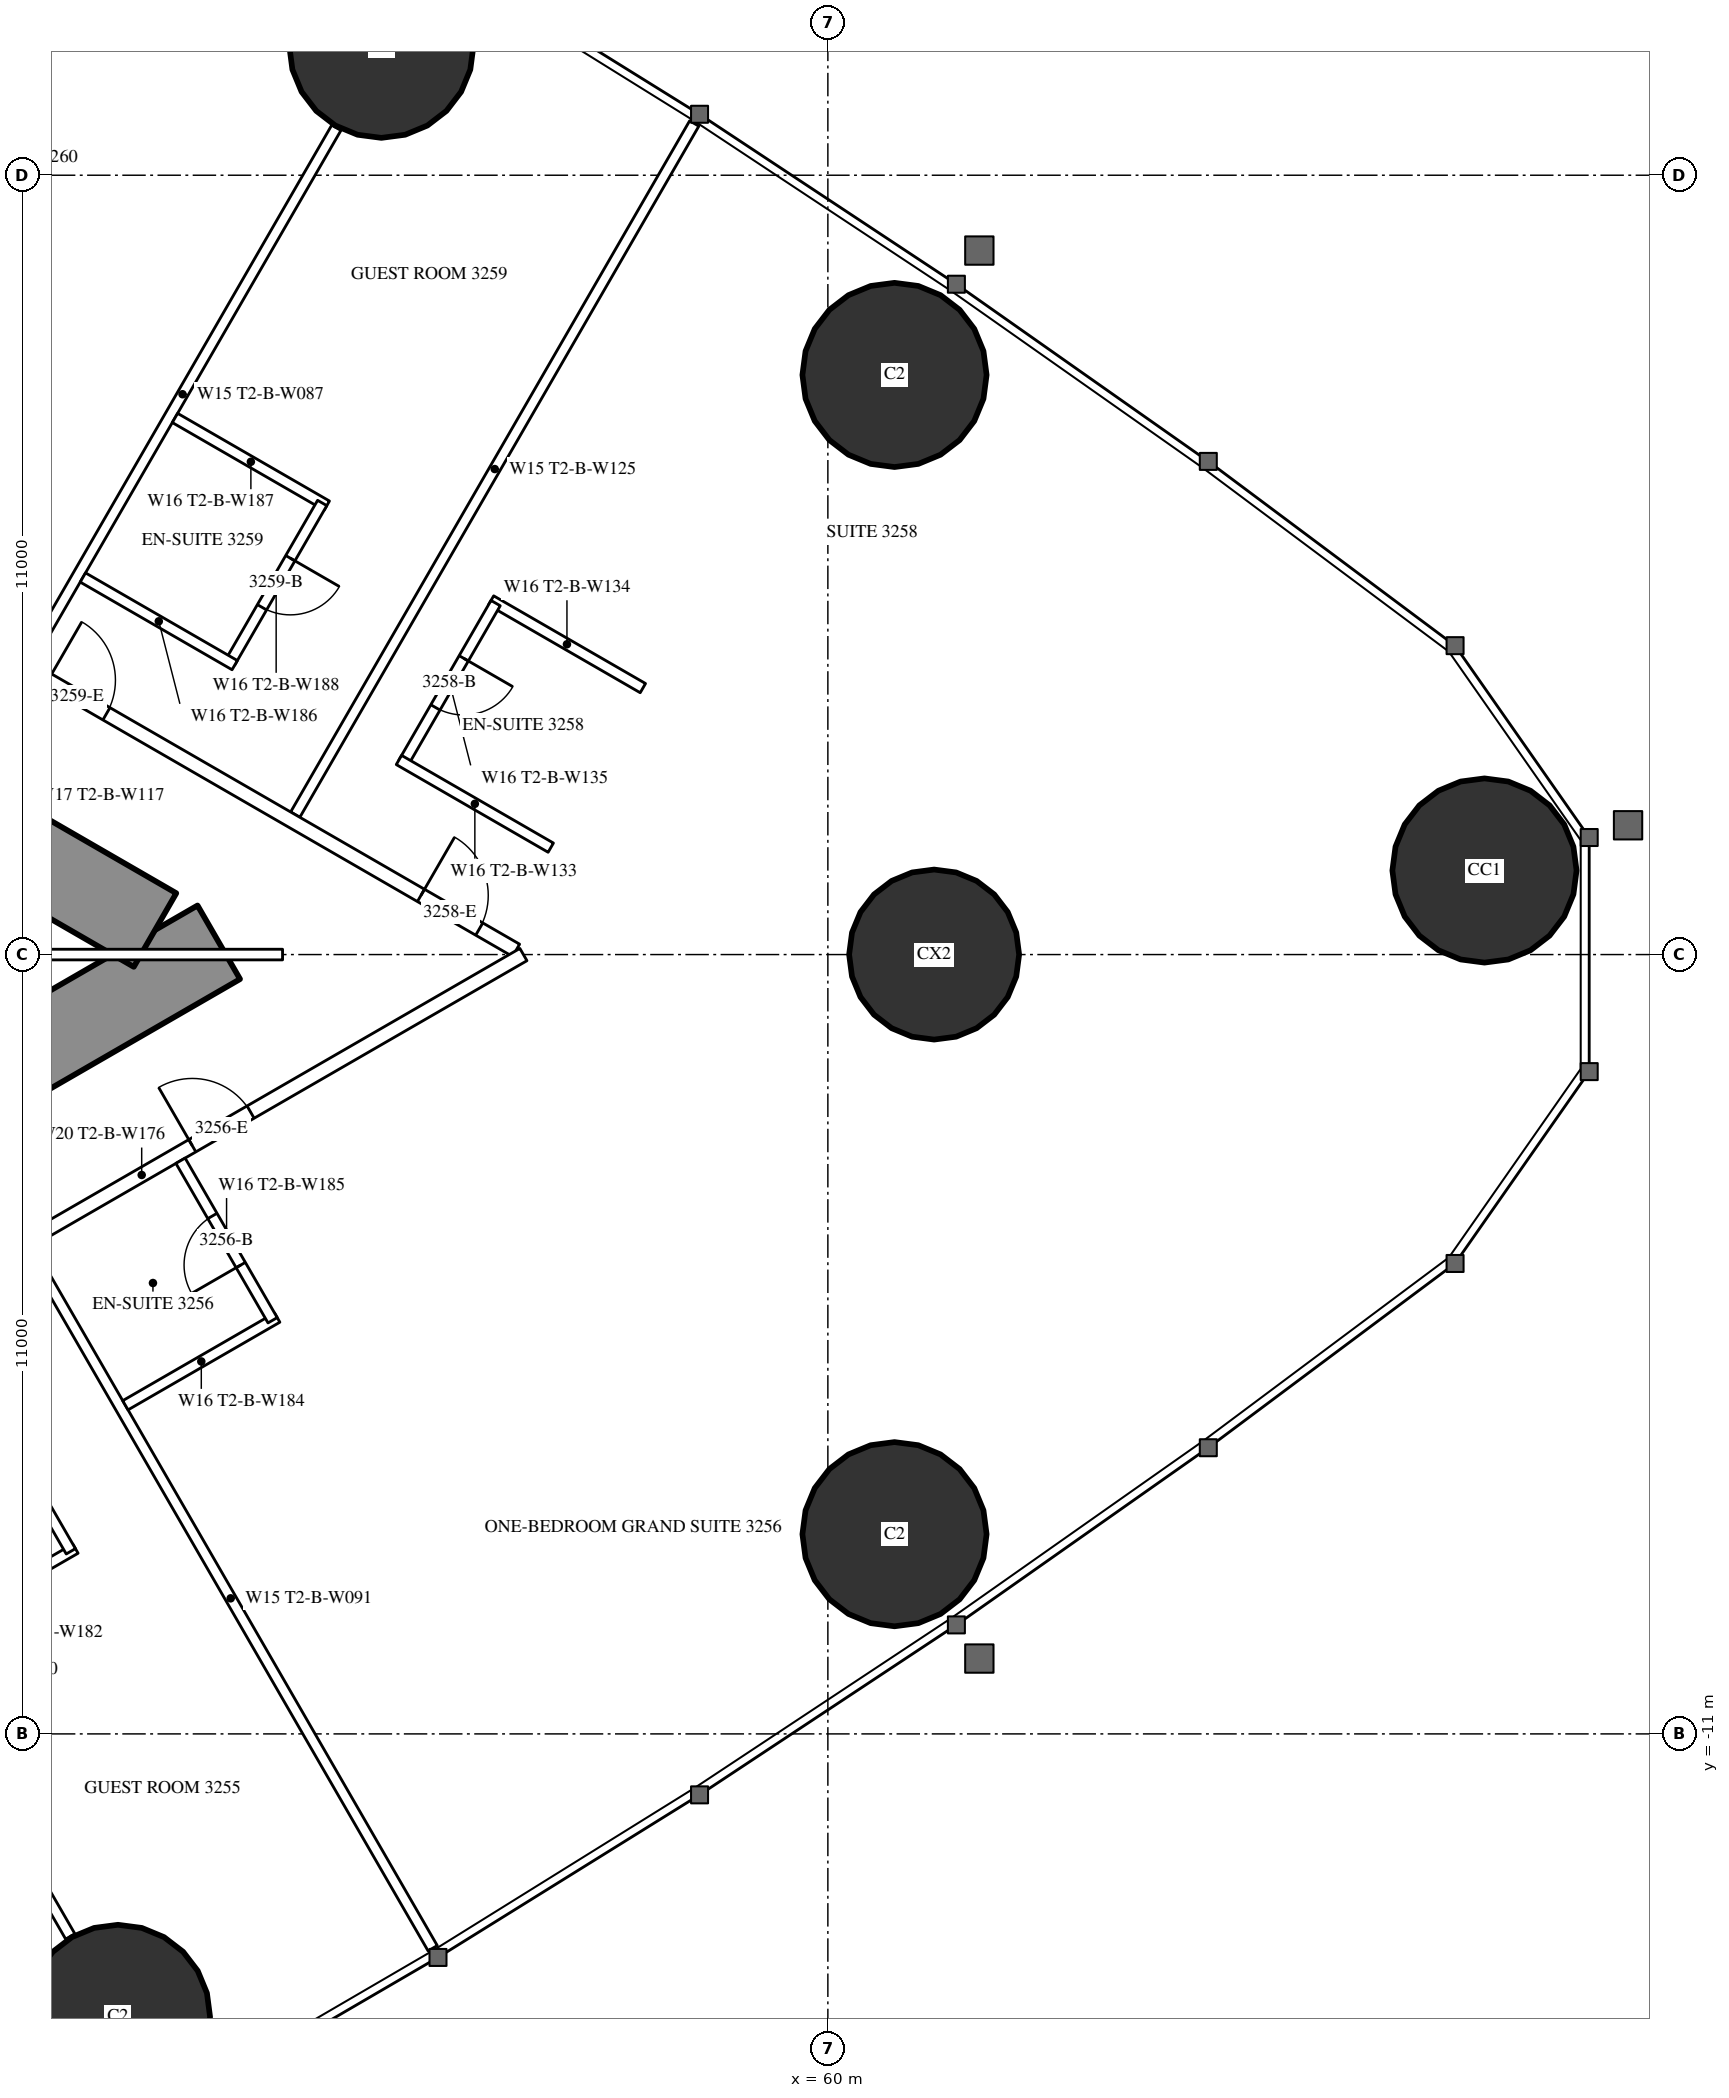
"""IFC4 building model, lengths in metres.
Left out: names, types, materials, properties, quantities, classifications, styles, units other than length and angle.
Written with IfcOpenShell. Run it as: python <this file> out.ifc"""

import sys

from ifc_helpers import new_model, si_unit, direction, frame, frame_2d, origin, origin_2d, place, context, subcontext, project, spatial, rectangle, circle, hollow_circle, extrude, element, fill, save


model = new_model("IFC4")
c1 = context("Model", 3, precision=1e-05, world=origin(), true_north=direction((0.0, 1.0)))
c2 = subcontext(c1, "Body", "Model", "MODEL_VIEW")
j1 = project(units=[si_unit("LENGTHUNIT", "METRE"), si_unit("PLANEANGLEUNIT", "RADIAN")], contexts=[c1])
p1 = place(None, origin())
s1 = spatial("IfcSite", under=j1, at=p1, CompositionType="ELEMENT")
p2 = place(p1, origin())
s2 = spatial("IfcBuilding", under=s1, at=p2, CompositionType="ELEMENT")
p3 = place(p2, frame((0.0, 0.0, 122.1)))
s3 = spatial("IfcBuildingStorey", under=s2, at=p3, CompositionType="ELEMENT", Elevation=122.1)
for number, where, z_axis, x_axis in (
    (1, (69.269, 1.187, 0.0), (0.0, 0.0, 1.0), (1.0, 0.0, 0.0)),
    (2, (60.941, 8.181, 0.0), (0.0, 0.0, 1.0), (1.0, 0.0, 0.0)),
    (3, (53.697, 12.827, 0.0), (0.0, 0.0, 1.0), (1.0, 0.0, 0.0)),
    (4, (49.979, -14.994, 0.0), (0.0, 0.0, 1.0), (1.0, 0.0, 0.0)),
    (5, (60.941, -8.181, 0.0), (0.0, 0.0, 1.0), (1.0, 0.0, 0.0)),
):
    element("IfcColumn", number, at=place(p3, frame(where, z_axis=z_axis, x_axis=x_axis)), inside=s3, PredefinedType="COLUMN", context=c2, shape_type="SweptSolid", body=[
        extrude(hollow_circle(Radius=1.3, WallThickness=0.1, at=origin_2d()), origin(), (0.0, 0.0, 1.0), 3.5),
    ])
p4 = place(p3, frame((61.5, 0.0, 0.0), z_axis=(0.0, 0.0, 1.0), x_axis=(1.0, 0.0, 0.0)))
e6 = element("IfcColumn", 6, at=p4, inside=s3, PredefinedType="COLUMN", context=c2, shape_type="SweptSolid", body=[
    extrude(circle(Radius=1.2, at=origin_2d()), origin(), (0.0, 0.0, 1.0), 3.5),
])
p5 = place(p3, frame((27.2, -13.8, 0.0), z_axis=(0.0, 0.0, 1.0), x_axis=(0.866027159892, 0.499996958321, 0.0)))
e7 = element("IfcWall", 7, at=p5, inside=s3, PredefinedType="SHEAR", context=c2, shape_type="SweptSolid", body=[
    extrude(rectangle(XDim=27.947, YDim=1.2, at=frame_2d((13.973, 0.0))), origin(), (0.0, 0.0, 1.0), 3.5),
])
p6 = place(p5, frame((4.6, 0.0, 0.0)))
e8 = element("IfcOpeningElement", 8, at=p6, cuts=e7, PredefinedType="OPENING", context=c2, shape_type="SweptSolid", body=[
    extrude(rectangle(XDim=1.0, YDim=2.2, at=frame_2d((0.5, 1.1))), frame((0.0, 0.61, 0.0), z_axis=(0.0, -1.0, 0.0), x_axis=(1.0, 0.0, 0.0)), (0.0, 0.0, 1.0), 1.22),
])
p7 = place(p5, frame((13.395, 0.0, 0.0)))
e9 = element("IfcOpeningElement", 9, at=p7, cuts=e7, PredefinedType="OPENING", context=c2, shape_type="SweptSolid", body=[
    extrude(rectangle(XDim=1.8, YDim=2.2, at=frame_2d((0.9, 1.1))), frame((0.0, 0.61, 0.0), z_axis=(0.0, -1.0, 0.0), x_axis=(1.0, 0.0, 0.0)), (0.0, 0.0, 1.0), 1.22),
])
p8 = place(p3, frame((27.2, 13.8, 0.0), z_axis=(0.0, 0.0, 1.0), x_axis=(0.866024515034, -0.500001539357, 0.0)))
e10 = element("IfcWall", 10, at=p8, inside=s3, PredefinedType="SHEAR", context=c2, shape_type="SweptSolid", body=[
    extrude(rectangle(XDim=26.907, YDim=1.2, at=frame_2d((13.454, 0.0))), origin(), (0.0, 0.0, 1.0), 3.5),
])
p9 = place(p8, frame((4.6, 0.0, 0.0)))
e11 = element("IfcOpeningElement", 11, at=p9, cuts=e10, PredefinedType="OPENING", context=c2, shape_type="SweptSolid", body=[
    extrude(rectangle(XDim=1.0, YDim=2.2, at=frame_2d((0.5, 1.1))), frame((0.0, 0.61, 0.0), z_axis=(0.0, -1.0, 0.0), x_axis=(1.0, 0.0, 0.0)), (0.0, 0.0, 1.0), 1.22),
])
p10 = place(p8, frame((13.395, 0.0, 0.0)))
e12 = element("IfcOpeningElement", 12, at=p10, cuts=e10, PredefinedType="OPENING", context=c2, shape_type="SweptSolid", body=[
    extrude(rectangle(XDim=1.8, YDim=2.2, at=frame_2d((0.9, 1.1))), frame((0.0, 0.61, 0.0), z_axis=(0.0, -1.0, 0.0), x_axis=(1.0, 0.0, 0.0)), (0.0, 0.0, 1.0), 1.22),
])
p11 = place(p3, frame((44.954, -6.321, 0.0), z_axis=(0.0, 0.0, 1.0), x_axis=(0.500018676722, -0.866014620505, 0.0)))
e13 = element("IfcWall", 13, at=p11, inside=s3, PredefinedType="PARTITIONING", context=c2, shape_type="SweptSolid", body=[
    extrude(rectangle(XDim=8.704, YDim=0.15, at=frame_2d((4.352, 0.0))), origin(), (0.0, 0.0, 1.0), 2.2),
])
p12 = place(p3, frame((48.719, -4.147, 0.0), z_axis=(0.0, 0.0, 1.0), x_axis=(0.499990498062, -0.866030889661, 0.0)))
e14 = element("IfcWall", 14, at=p12, inside=s3, PredefinedType="PARTITIONING", context=c2, shape_type="SweptSolid", body=[
    extrude(rectangle(XDim=11.406, YDim=0.15, at=frame_2d((5.703, 0.0))), origin(), (0.0, 0.0, 1.0), 3.25),
])
p13 = place(p3, frame((48.719, 4.147, 0.0), z_axis=(0.0, 0.0, 1.0), x_axis=(0.499993328235, 0.866029255696, 0.0)))
e15 = element("IfcWall", 15, at=p13, inside=s3, PredefinedType="PARTITIONING", context=c2, shape_type="SweptSolid", body=[
    extrude(rectangle(XDim=8.686, YDim=0.15, at=frame_2d((4.343, 0.0))), origin(), (0.0, 0.0, 1.0), 2.2),
])
p14 = place(p3, frame((52.481, 1.975, 0.0), z_axis=(0.0, 0.0, 1.0), x_axis=(0.500003867771, 0.866023170714, 0.0)))
e16 = element("IfcWall", 16, at=p14, inside=s3, PredefinedType="PARTITIONING", context=c2, shape_type="SweptSolid", body=[
    extrude(rectangle(XDim=11.265, YDim=0.15, at=frame_2d((5.632, 0.0))), origin(), (0.0, 0.0, 1.0), 3.25),
])
p15 = place(p3, frame((36.834, 10.894, 0.0), z_axis=(0.0, 0.0, 1.0), x_axis=(0.866028157229, -0.499995230863, 0.0)))
e17 = element("IfcWall", 17, at=p15, inside=s3, PredefinedType="PARTITIONING", context=c2, shape_type="SweptSolid", body=[
    extrude(rectangle(XDim=21.667, YDim=0.2, at=frame_2d((10.833, 0.0))), origin(), (0.0, 0.0, 1.0), 3.25),
])
p16 = place(p15, frame((20.117, 0.0, 0.0)))
e18 = element("IfcOpeningElement", 18, at=p16, cuts=e17, PredefinedType="OPENING", context=c2, shape_type="SweptSolid", body=[
    extrude(rectangle(XDim=0.95, YDim=2.2, at=frame_2d((0.475, 1.1))), frame((0.0, 0.11, 0.0), z_axis=(0.0, -1.0, 0.0), x_axis=(1.0, 0.0, 0.0)), (0.0, 0.0, 1.0), 0.22),
])
p17 = place(p15, frame((14.04, 0.0, 0.0)))
e19 = element("IfcOpeningElement", 19, at=p17, cuts=e17, PredefinedType="OPENING", context=c2, shape_type="SweptSolid", body=[
    extrude(rectangle(XDim=0.95, YDim=2.2, at=frame_2d((0.475, 1.1))), frame((0.0, 0.11, 0.0), z_axis=(0.0, -1.0, 0.0), x_axis=(1.0, 0.0, 0.0)), (0.0, 0.0, 1.0), 0.22),
])
p18 = place(p15, frame((7.697, 0.0, 0.0)))
e20 = element("IfcOpeningElement", 20, at=p18, cuts=e17, PredefinedType="OPENING", context=c2, shape_type="SweptSolid", body=[
    extrude(rectangle(XDim=0.95, YDim=2.2, at=frame_2d((0.475, 1.1))), frame((0.0, 0.11, 0.0), z_axis=(0.0, -1.0, 0.0), x_axis=(1.0, 0.0, 0.0)), (0.0, 0.0, 1.0), 0.22),
])
p19 = place(p15, frame((3.35, 0.0, 0.0)))
e21 = element("IfcOpeningElement", 21, at=p19, cuts=e17, PredefinedType="OPENING", context=c2, shape_type="SweptSolid", body=[
    extrude(rectangle(XDim=1.0, YDim=2.2, at=frame_2d((0.5, 1.1))), frame((0.0, 0.11, 0.0), z_axis=(0.0, -1.0, 0.0), x_axis=(1.0, 0.0, 0.0)), (0.0, 0.0, 1.0), 0.22),
])
p20 = place(p3, frame((44.925, -6.222, 0.0), z_axis=(0.0, 0.0, 1.0), x_axis=(0.866020269055, 0.500008893506, 0.0)))
e22 = element("IfcWall", 22, at=p20, inside=s3, PredefinedType="PARTITIONING", context=c2, shape_type="SweptSolid", body=[
    extrude(rectangle(XDim=12.444, YDim=0.2, at=frame_2d((6.222, 0.0))), origin(), (0.0, 0.0, 1.0), 3.25),
])
p21 = place(p20, frame((0.6, 0.0, 0.0)))
e23 = element("IfcOpeningElement", 23, at=p21, cuts=e22, PredefinedType="OPENING", context=c2, shape_type="SweptSolid", body=[
    extrude(rectangle(XDim=0.95, YDim=2.2, at=frame_2d((0.475, 1.1))), frame((0.0, 0.11, 0.0), z_axis=(0.0, -1.0, 0.0), x_axis=(1.0, 0.0, 0.0)), (0.0, 0.0, 1.0), 0.22),
])
p22 = place(p20, frame((7.047, 0.0, 0.0)))
e24 = element("IfcOpeningElement", 24, at=p22, cuts=e22, PredefinedType="OPENING", context=c2, shape_type="SweptSolid", body=[
    extrude(rectangle(XDim=0.95, YDim=2.2, at=frame_2d((0.475, 1.1))), frame((0.0, 0.11, 0.0), z_axis=(0.0, -1.0, 0.0), x_axis=(1.0, 0.0, 0.0)), (0.0, 0.0, 1.0), 0.22),
])
p23 = place(p3, frame((47.235, -9.623, 0.0), z_axis=(0.0, 0.0, 1.0), x_axis=(0.866006523861, 0.500032699561, 0.0)))
e25 = element("IfcWall", 25, at=p23, inside=s3, PredefinedType="PARTITIONING", context=c2, shape_type="SweptSolid", body=[
    extrude(rectangle(XDim=2.475, YDim=0.15, at=frame_2d((1.237, 0.0))), origin(), (0.0, 0.0, 1.0), 3.25),
])
p24 = place(p3, frame((48.013, -6.171, 0.0), z_axis=(0.0, 0.0, 1.0), x_axis=(0.500006934395, -0.866021400173, 0.0)))
e26 = element("IfcWall", 26, at=p24, inside=s3, PredefinedType="PARTITIONING", context=c2, shape_type="SweptSolid", body=[
    extrude(rectangle(XDim=2.6, YDim=0.15, at=frame_2d((1.3, 0.0))), origin(), (0.0, 0.0, 1.0), 3.25),
])
p25 = place(p24, frame((0.9, 0.0, 0.0)))
e27 = element("IfcOpeningElement", 27, at=p25, cuts=e26, PredefinedType="OPENING", context=c2, shape_type="SweptSolid", body=[
    extrude(rectangle(XDim=0.8, YDim=2.2, at=frame_2d((0.4, 1.1))), frame((0.0, 0.085, 0.0), z_axis=(0.0, -1.0, 0.0), x_axis=(1.0, 0.0, 0.0)), (0.0, 0.0, 1.0), 0.17),
])
p26 = place(p3, frame((50.083, -6.362, 0.0), z_axis=(0.0, 0.0, 1.0), x_axis=(0.866006523861, 0.500032699561, 0.0)))
e28 = element("IfcWall", 28, at=p26, inside=s3, PredefinedType="PARTITIONING", context=c2, shape_type="SweptSolid", body=[
    extrude(rectangle(XDim=2.475, YDim=0.15, at=frame_2d((1.237, 0.0))), origin(), (0.0, 0.0, 1.0), 3.25),
])
p27 = place(p3, frame((50.862, -2.91, 0.0), z_axis=(0.0, 0.0, 1.0), x_axis=(0.500047596559, -0.865997922154, 0.0)))
e29 = element("IfcWall", 29, at=p27, inside=s3, PredefinedType="PARTITIONING", context=c2, shape_type="SweptSolid", body=[
    extrude(rectangle(XDim=2.6, YDim=0.15, at=frame_2d((1.3, 0.0))), origin(), (0.0, 0.0, 1.0), 3.25),
])
p28 = place(p27, frame((0.9, 0.0, 0.0)))
e30 = element("IfcOpeningElement", 30, at=p28, cuts=e29, PredefinedType="OPENING", context=c2, shape_type="SweptSolid", body=[
    extrude(rectangle(XDim=0.8, YDim=2.2, at=frame_2d((0.4, 1.1))), frame((0.0, 0.085, 0.0), z_axis=(0.0, -1.0, 0.0), x_axis=(1.0, 0.0, 0.0)), (0.0, 0.0, 1.0), 0.17),
])
p29 = place(p3, frame((55.245, 4.998, 0.0), z_axis=(0.0, 0.0, 1.0), x_axis=(0.866006523861, -0.500032699561, 0.0)))
e31 = element("IfcWall", 31, at=p29, inside=s3, PredefinedType="PARTITIONING", context=c2, shape_type="SweptSolid", body=[
    extrude(rectangle(XDim=2.475, YDim=0.15, at=frame_2d((1.237, 0.0))), origin(), (0.0, 0.0, 1.0), 3.25),
])
p30 = place(p3, frame((54.01, 2.709, 0.0), z_axis=(0.0, 0.0, 1.0), x_axis=(0.500006934395, 0.866021400173, 0.0)))
e32 = element("IfcWall", 32, at=p30, inside=s3, PredefinedType="PARTITIONING", context=c2, shape_type="SweptSolid", body=[
    extrude(rectangle(XDim=2.6, YDim=0.15, at=frame_2d((1.3, 0.0))), origin(), (0.0, 0.0, 1.0), 3.25),
])
p31 = place(p30, frame((0.9, 0.0, 0.0)))
e33 = element("IfcOpeningElement", 33, at=p31, cuts=e32, PredefinedType="OPENING", context=c2, shape_type="SweptSolid", body=[
    extrude(rectangle(XDim=0.8, YDim=2.2, at=frame_2d((0.4, 1.1))), frame((0.0, 0.085, 0.0), z_axis=(0.0, -1.0, 0.0), x_axis=(1.0, 0.0, 0.0)), (0.0, 0.0, 1.0), 0.17),
])
p32 = place(p3, frame((53.945, 2.747, 0.0), z_axis=(0.0, 0.0, 1.0), x_axis=(0.866031185235, -0.4999899861, 0.0)))
e34 = element("IfcWall", 34, at=p32, inside=s3, PredefinedType="PARTITIONING", context=c2, shape_type="SweptSolid", body=[
    extrude(rectangle(XDim=2.475, YDim=0.15, at=frame_2d((1.238, 0.0))), origin(), (0.0, 0.0, 1.0), 3.25),
])
p33 = place(p3, frame((50.783, 7.574, 0.0), z_axis=(0.0, 0.0, 1.0), x_axis=(0.866006523861, -0.500032699561, 0.0)))
e35 = element("IfcWall", 35, at=p33, inside=s3, PredefinedType="PARTITIONING", context=c2, shape_type="SweptSolid", body=[
    extrude(rectangle(XDim=2.475, YDim=0.15, at=frame_2d((1.237, 0.0))), origin(), (0.0, 0.0, 1.0), 3.25),
])
p34 = place(p3, frame((51.562, 4.123, 0.0), z_axis=(0.0, 0.0, 1.0), x_axis=(0.49997716683, 0.86603858612, 0.0)))
e36 = element("IfcWall", 36, at=p34, inside=s3, PredefinedType="PARTITIONING", context=c2, shape_type="SweptSolid", body=[
    extrude(rectangle(XDim=2.6, YDim=0.15, at=frame_2d((1.3, 0.0))), origin(), (0.0, 0.0, 1.0), 3.25),
])
p35 = place(p34, frame((0.9, 0.0, 0.0)))
e37 = element("IfcOpeningElement", 37, at=p35, cuts=e36, PredefinedType="OPENING", context=c2, shape_type="SweptSolid", body=[
    extrude(rectangle(XDim=0.8, YDim=2.2, at=frame_2d((0.4, 1.1))), frame((0.0, 0.085, 0.0), z_axis=(0.0, -1.0, 0.0), x_axis=(1.0, 0.0, 0.0)), (0.0, 0.0, 1.0), 0.17),
])
p36 = place(p3, frame((49.483, 5.323, 0.0), z_axis=(0.0, 0.0, 1.0), x_axis=(0.866031185235, -0.4999899861, 0.0)))
e38 = element("IfcWall", 38, at=p36, inside=s3, PredefinedType="PARTITIONING", context=c2, shape_type="SweptSolid", body=[
    extrude(rectangle(XDim=2.475, YDim=0.15, at=frame_2d((1.238, 0.0))), origin(), (0.0, 0.0, 1.0), 3.25),
])
p37 = place(p3, frame((44.575, 0.0, 0.0), z_axis=(0.0, 0.0, 1.0), x_axis=(1.0, 0.0, 0.0)))
e39 = element("IfcWall", 39, at=p37, inside=s3, PredefinedType="PARTITIONING", context=c2, shape_type="SweptSolid", body=[
    extrude(rectangle(XDim=7.727, YDim=0.15, at=frame_2d((3.864, 0.0))), origin(), (0.0, 0.0, 1.0), 2.2),
])
p38 = place(p28, origin())
e40 = element("IfcDoor", 40, at=p38, inside=s3, OperationType="SINGLE_SWING_RIGHT", PredefinedType="DOOR", context=c2, shape_type="SweptSolid", body=[
    extrude(rectangle(XDim=0.8, YDim=2.2, at=frame_2d((0.4, 1.1))), frame((0.0, 0.025, 0.0), z_axis=(0.0, -1.0, 0.0), x_axis=(1.0, 0.0, 0.0)), (0.0, 0.0, 1.0), 0.05),
])
fill(e30, e40)
p39 = place(p22, origin())
e41 = element("IfcDoor", 41, at=p39, inside=s3, OperationType="SINGLE_SWING_LEFT", PredefinedType="DOOR", context=c2, shape_type="SweptSolid", body=[
    extrude(rectangle(XDim=0.95, YDim=2.2, at=frame_2d((0.475, 1.1))), frame((0.0, 0.025, 0.0), z_axis=(0.0, -1.0, 0.0), x_axis=(1.0, 0.0, 0.0)), (0.0, 0.0, 1.0), 0.05),
])
fill(e24, e41)
p40 = place(p31, origin())
e42 = element("IfcDoor", 42, at=p40, inside=s3, OperationType="SINGLE_SWING_RIGHT", PredefinedType="DOOR", context=c2, shape_type="SweptSolid", body=[
    extrude(rectangle(XDim=0.8, YDim=2.2, at=frame_2d((0.4, 1.1))), frame((0.0, 0.025, 0.0), z_axis=(0.0, -1.0, 0.0), x_axis=(1.0, 0.0, 0.0)), (0.0, 0.0, 1.0), 0.05),
])
fill(e33, e42)
p41 = place(p16, origin())
e43 = element("IfcDoor", 43, at=p41, inside=s3, OperationType="SINGLE_SWING_LEFT", PredefinedType="DOOR", context=c2, shape_type="SweptSolid", body=[
    extrude(rectangle(XDim=0.95, YDim=2.2, at=frame_2d((0.475, 1.1))), frame((0.0, 0.025, 0.0), z_axis=(0.0, -1.0, 0.0), x_axis=(1.0, 0.0, 0.0)), (0.0, 0.0, 1.0), 0.05),
])
fill(e18, e43)
p42 = place(p35, origin())
e44 = element("IfcDoor", 44, at=p42, inside=s3, OperationType="SINGLE_SWING_RIGHT", PredefinedType="DOOR", context=c2, shape_type="SweptSolid", body=[
    extrude(rectangle(XDim=0.8, YDim=2.2, at=frame_2d((0.4, 1.1))), frame((0.0, 0.025, 0.0), z_axis=(0.0, -1.0, 0.0), x_axis=(1.0, 0.0, 0.0)), (0.0, 0.0, 1.0), 0.05),
])
fill(e37, e44)
p43 = place(p17, origin())
e45 = element("IfcDoor", 45, at=p43, inside=s3, OperationType="SINGLE_SWING_LEFT", PredefinedType="DOOR", context=c2, shape_type="SweptSolid", body=[
    extrude(rectangle(XDim=0.95, YDim=2.2, at=frame_2d((0.475, 1.1))), frame((0.0, 0.025, 0.0), z_axis=(0.0, -1.0, 0.0), x_axis=(1.0, 0.0, 0.0)), (0.0, 0.0, 1.0), 0.05),
])
fill(e19, e45)
save(model, sys.argv[1])
